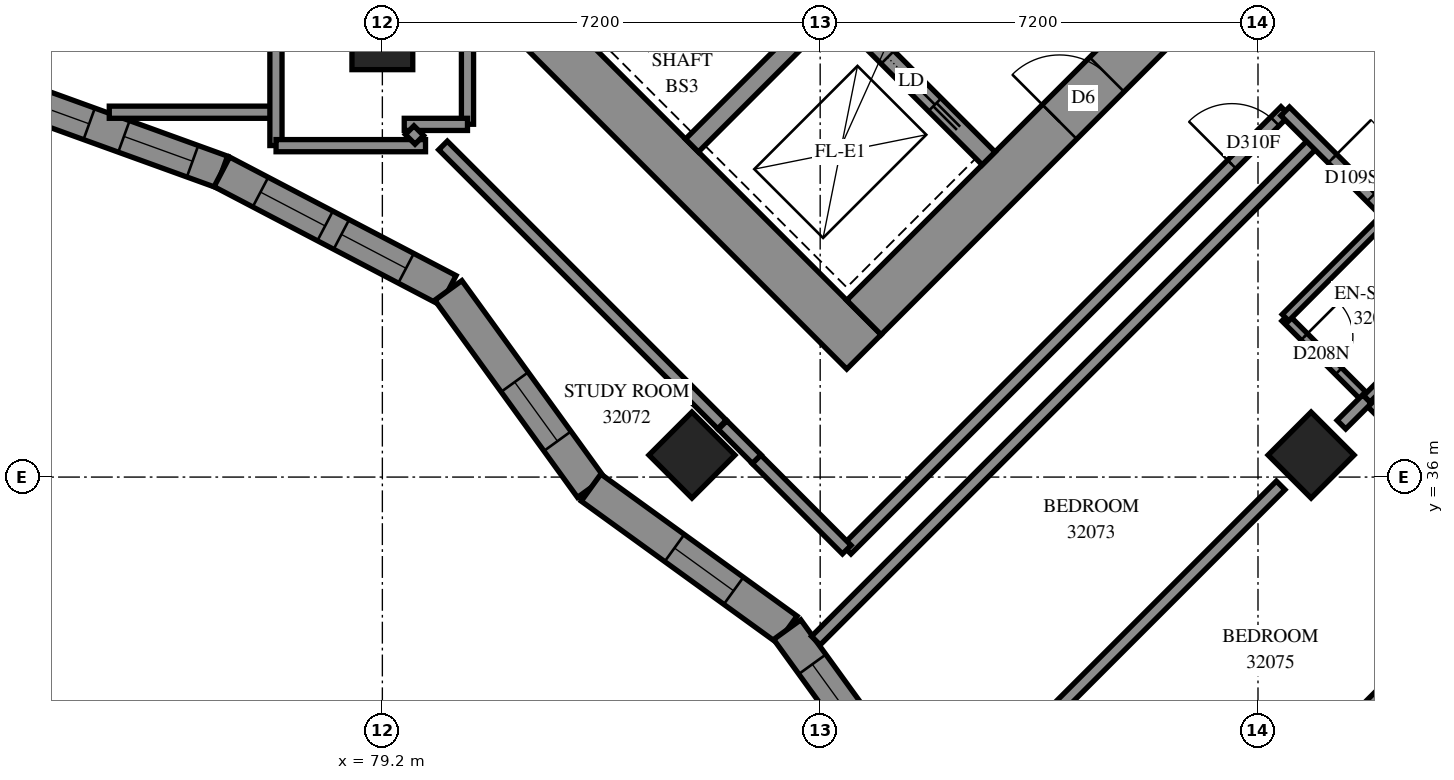
"""IFC4 building model, lengths in metres.
Left out: names, types, materials, properties, quantities, classifications, styles, units other than length and angle.
Written with IfcOpenShell. Run it as: python <this file> out.ifc"""

import sys

from ifc_helpers import new_model, si_unit, direction, frame, frame_2d, origin, origin_2d, place, context, subcontext, project, spatial, polyline, rectangle, outline, extrude, element, fill, save


model = new_model("IFC4")
c1 = context("Model", 3, precision=1e-05, world=origin(), true_north=direction((0.0, 1.0)))
c2 = subcontext(c1, "Body", "Model", "MODEL_VIEW")
j1 = project(units=[si_unit("LENGTHUNIT", "METRE"), si_unit("PLANEANGLEUNIT", "RADIAN")], contexts=[c1])
p1 = place(None, origin())
s1 = spatial("IfcSite", under=j1, at=p1, CompositionType="ELEMENT")
p2 = place(p1, origin())
s2 = spatial("IfcBuilding", under=s1, at=p2, CompositionType="ELEMENT")
p3 = place(p2, frame((0.0, 0.0, 118.6)))
s3 = spatial("IfcBuildingStorey", under=s2, at=p3, CompositionType="ELEMENT", Elevation=118.6)
for number, where, z_axis, x_axis in (
    (1, (79.2, 43.2, 0.0), (0.0, 0.0, 1.0), (1.0, 0.0, 0.0)),
    (2, (84.291, 36.362, 0.0), (0.0, 0.0, 1.0), (0.707, -0.707, 0.0)),
    (3, (94.474, 36.362, 0.0), (0.0, 0.0, 1.0), (0.707, -0.707, 0.0)),
):
    element("IfcColumn", number, at=place(p3, frame(where, z_axis=z_axis, x_axis=x_axis)), inside=s3, PredefinedType="COLUMN", context=c2, shape_type="SweptSolid", body=[
        extrude(rectangle(XDim=1.0, YDim=1.0, at=origin_2d()), origin(), (0.0, 0.0, 1.0), 3.1),
    ])
p4 = place(p3, frame((75.806, 49.373, -0.3), z_axis=(0.0, 0.0, 1.0), x_axis=(0.7071067812, -0.7071067812, 0.0)))
e4 = element("IfcWall", 4, at=p4, inside=s3, PredefinedType="SHEAR", context=c2, shape_type="SweptSolid", body=[
    extrude(rectangle(XDim=16.0, YDim=0.8, at=frame_2d((8.0, 0.0))), origin(), (0.0, 0.0, 1.0), 2.7),
])
p5 = place(p3, frame((87.12, 38.625, -0.3), z_axis=(0.0, 0.0, 1.0), x_axis=(0.7071067812, 0.7071067812, 0.0)))
e5 = element("IfcWall", 5, at=p5, inside=s3, PredefinedType="SHEAR", context=c2, shape_type="SweptSolid", body=[
    extrude(rectangle(XDim=14.4, YDim=0.8, at=frame_2d((7.2, 0.0))), origin(), (0.0, 0.0, 1.0), 2.7),
])
p6 = place(p5, frame((4.55, 0.0, 0.3)))
e6 = element("IfcOpeningElement", 6, at=p6, cuts=e5, PredefinedType="OPENING", context=c2, shape_type="SweptSolid", body=[
    extrude(rectangle(XDim=1.1, YDim=2.1, at=frame_2d((0.55, 1.05))), frame((0.0, 0.41, 0.0), z_axis=(0.0, -1.0, 0.0), x_axis=(1.0, 0.0, 0.0)), (0.0, 0.0, 1.0), 0.82),
])
p7 = place(p5, frame((11.35, 0.0, 0.3)))
e7 = element("IfcOpeningElement", 7, at=p7, cuts=e5, PredefinedType="OPENING", context=c2, shape_type="SweptSolid", body=[
    extrude(rectangle(XDim=1.1, YDim=2.1, at=frame_2d((0.55, 1.05))), frame((0.0, 0.41, 0.0), z_axis=(0.0, -1.0, 0.0), x_axis=(1.0, 0.0, 0.0)), (0.0, 0.0, 1.0), 0.82),
])
p8 = place(p3, frame((84.291, 41.453, 0.0), z_axis=(0.0, 0.0, 1.0), x_axis=(0.7071067812, 0.7071067812, 0.0)))
e8 = element("IfcWall", 8, at=p8, inside=s3, PredefinedType="SOLIDWALL", context=c2, shape_type="SweptSolid", body=[
    extrude(rectangle(XDim=3.3, YDim=0.3, at=frame_2d((1.65, 0.0))), origin(), (0.0, 0.0, 1.0), 3.1),
])
p9 = place(p3, frame((78.988, 51.423, 0.0), z_axis=(0.0, 0.0, 1.0), x_axis=(0.7071067812, -0.7071067812, 0.0)))
e9 = element("IfcWall", 9, at=p9, inside=s3, PredefinedType="SOLIDWALL", context=c2, shape_type="SweptSolid", body=[
    extrude(rectangle(XDim=14.4, YDim=0.3, at=frame_2d((7.2, 0.0))), origin(), (0.0, 0.0, 1.0), 3.1),
])
p10 = place(p9, frame((1.25, 0.0, 0.0)))
e10 = element("IfcOpeningElement", 10, at=p10, cuts=e9, PredefinedType="OPENING", context=c2, shape_type="SweptSolid", body=[
    extrude(rectangle(XDim=1.1, YDim=2.1, at=frame_2d((0.55, 1.05))), frame((0.0, 0.16, 0.0), z_axis=(0.0, -1.0, 0.0), x_axis=(1.0, 0.0, 0.0)), (0.0, 0.0, 1.0), 0.32),
])
p11 = place(p9, frame((4.85, 0.0, 0.0)))
e11 = element("IfcOpeningElement", 11, at=p11, cuts=e9, PredefinedType="OPENING", context=c2, shape_type="SweptSolid", body=[
    extrude(rectangle(XDim=1.1, YDim=2.1, at=frame_2d((0.55, 1.05))), frame((0.0, 0.16, 0.0), z_axis=(0.0, -1.0, 0.0), x_axis=(1.0, 0.0, 0.0)), (0.0, 0.0, 1.0), 0.32),
])
p12 = place(p9, frame((8.45, 0.0, 0.0)))
e12 = element("IfcOpeningElement", 12, at=p12, cuts=e9, PredefinedType="OPENING", context=c2, shape_type="SweptSolid", body=[
    extrude(rectangle(XDim=1.1, YDim=2.1, at=frame_2d((0.55, 1.05))), frame((0.0, 0.16, 0.0), z_axis=(0.0, -1.0, 0.0), x_axis=(1.0, 0.0, 0.0)), (0.0, 0.0, 1.0), 0.32),
])
p13 = place(p9, frame((12.05, 0.0, 0.0)))
e13 = element("IfcOpeningElement", 13, at=p13, cuts=e9, PredefinedType="OPENING", context=c2, shape_type="SweptSolid", body=[
    extrude(rectangle(XDim=1.1, YDim=2.1, at=frame_2d((0.55, 1.05))), frame((0.0, 0.16, 0.0), z_axis=(0.0, -1.0, 0.0), x_axis=(1.0, 0.0, 0.0)), (0.0, 0.0, 1.0), 0.32),
])
p14 = place(p3, frame((73.067, 42.284, 0.0), z_axis=(0.0, 0.0, 1.0), x_axis=(0.9402976308, -0.3403532953, 0.0)))
e14 = element("IfcWall", 14, at=p14, inside=s3, PredefinedType="SOLIDWALL", context=c2, shape_type="SweptSolid", body=[
    extrude(outline(polyline([(0.075, -0.275), (3.697, -0.275), (3.734, 0.275), (-0.075, 0.275), (0.075, -0.275)])), origin(), (0.0, 0.0, 1.0), 3.1),
])
p15 = place(p14, frame((0.396, 0.0, 0.45)))
e15 = element("IfcOpeningElement", 15, at=p15, cuts=e14, PredefinedType="OPENING", context=c2, shape_type="SweptSolid", body=[
    extrude(rectangle(XDim=1.0, YDim=2.5, at=frame_2d((0.5, 1.25))), frame((0.0, 0.285, 0.0), z_axis=(0.0, -1.0, 0.0), x_axis=(1.0, 0.0, 0.0)), (0.0, 0.0, 1.0), 0.57),
])
p16 = place(p14, frame((2.003, 0.0, 0.5)))
e16 = element("IfcOpeningElement", 16, at=p16, cuts=e14, PredefinedType="OPENING", context=c2, shape_type="SweptSolid", body=[
    extrude(rectangle(XDim=1.2, YDim=2.45, at=frame_2d((0.6, 1.225))), frame((0.0, 0.285, 0.0), z_axis=(0.0, -1.0, 0.0), x_axis=(1.0, 0.0, 0.0)), (0.0, 0.0, 1.0), 0.57),
])
p17 = place(p3, frame((76.561, 41.019, 0.0), z_axis=(0.0, 0.0, 1.0), x_axis=(0.8859460506, -0.4637883089, 0.0)))
e17 = element("IfcWall", 17, at=p17, inside=s3, PredefinedType="SOLIDWALL", context=c2, shape_type="SweptSolid", body=[
    extrude(outline(polyline([(0.019, -0.275), (4.139, -0.275), (4.268, 0.275), (-0.019, 0.275), (0.019, -0.275)])), origin(), (0.0, 0.0, 1.0), 3.1),
])
p18 = place(p17, frame((0.717, 0.0, 0.5)))
e18 = element("IfcOpeningElement", 18, at=p18, cuts=e17, PredefinedType="OPENING", context=c2, shape_type="SweptSolid", body=[
    extrude(rectangle(XDim=1.2, YDim=2.45, at=frame_2d((0.6, 1.225))), frame((0.0, 0.285, 0.0), z_axis=(0.0, -1.0, 0.0), x_axis=(1.0, 0.0, 0.0)), (0.0, 0.0, 1.0), 0.57),
])
p19 = place(p17, frame((2.219, 0.0, 0.5)))
e19 = element("IfcOpeningElement", 19, at=p19, cuts=e17, PredefinedType="OPENING", context=c2, shape_type="SweptSolid", body=[
    extrude(rectangle(XDim=1.2, YDim=2.45, at=frame_2d((0.6, 1.225))), frame((0.0, 0.285, 0.0), z_axis=(0.0, -1.0, 0.0), x_axis=(1.0, 0.0, 0.0)), (0.0, 0.0, 1.0), 0.57),
])
p20 = place(p3, frame((80.285, 39.07, 0.0), z_axis=(0.0, 0.0, 1.0), x_axis=(0.5863448025, -0.8100615857, 0.0)))
e20 = element("IfcWall", 20, at=p20, inside=s3, PredefinedType="SOLIDWALL", context=c2, shape_type="SweptSolid", body=[
    extrude(outline(polyline([(0.065, -0.275), (4.047, -0.275), (3.959, 0.275), (-0.065, 0.275), (0.065, -0.275)])), origin(), (0.0, 0.0, 1.0), 3.1),
])
p21 = place(p20, frame((1.861, 0.0, 0.5)))
e21 = element("IfcOpeningElement", 21, at=p21, cuts=e20, PredefinedType="OPENING", context=c2, shape_type="SweptSolid", body=[
    extrude(rectangle(XDim=1.2, YDim=2.45, at=frame_2d((0.6, 1.225))), frame((0.0, 0.285, 0.0), z_axis=(0.0, -1.0, 0.0), x_axis=(1.0, 0.0, 0.0)), (0.0, 0.0, 1.0), 0.57),
])
p22 = place(p3, frame((82.632, 35.827, 0.0), z_axis=(0.0, 0.0, 1.0), x_axis=(0.8100630266, -0.5863428119, 0.0)))
e22 = element("IfcWall", 22, at=p22, inside=s3, PredefinedType="SOLIDWALL", context=c2, shape_type="SweptSolid", body=[
    extrude(outline(polyline([(-0.044, -0.275), (3.939, -0.275), (4.027, 0.275), (0.044, 0.275), (-0.044, -0.275)])), origin(), (0.0, 0.0, 1.0), 3.1),
])
p23 = place(p22, frame((1.694, 0.0, 0.5)))
e23 = element("IfcOpeningElement", 23, at=p23, cuts=e22, PredefinedType="OPENING", context=c2, shape_type="SweptSolid", body=[
    extrude(rectangle(XDim=1.2, YDim=2.45, at=frame_2d((0.6, 1.225))), frame((0.0, 0.285, 0.0), z_axis=(0.0, -1.0, 0.0), x_axis=(1.0, 0.0, 0.0)), (0.0, 0.0, 1.0), 0.57),
])
p24 = place(p3, frame((85.858, 33.492, 0.0), z_axis=(0.0, 0.0, 1.0), x_axis=(0.5863547381, -0.8100543939, 0.0)))
e24 = element("IfcWall", 24, at=p24, inside=s3, PredefinedType="SOLIDWALL", context=c2, shape_type="SweptSolid", body=[
    extrude(outline(polyline([(0.044, -0.275), (4.027, -0.275), (3.939, 0.275), (-0.044, 0.275), (0.044, -0.275)])), origin(), (0.0, 0.0, 1.0), 3.1),
])
p25 = place(p24, frame((0.704, 0.0, 0.5)))
e25 = element("IfcOpeningElement", 25, at=p25, cuts=e24, PredefinedType="OPENING", context=c2, shape_type="SweptSolid", body=[
    extrude(rectangle(XDim=1.3, YDim=2.45, at=frame_2d((0.65, 1.225))), frame((0.0, 0.285, 0.0), z_axis=(0.0, -1.0, 0.0), x_axis=(1.0, 0.0, 0.0)), (0.0, 0.0, 1.0), 0.57),
])
p26 = place(p24, frame((2.204, 0.0, 0.5)))
e26 = element("IfcOpeningElement", 26, at=p26, cuts=e24, PredefinedType="OPENING", context=c2, shape_type="SweptSolid", body=[
    extrude(rectangle(XDim=1.3, YDim=2.45, at=frame_2d((0.65, 1.225))), frame((0.0, 0.285, 0.0), z_axis=(0.0, -1.0, 0.0), x_axis=(1.0, 0.0, 0.0)), (0.0, 0.0, 1.0), 0.57),
])
p27 = place(p3, frame((86.329, 33.31, 0.0), z_axis=(0.0, 0.0, 1.0), x_axis=(0.7071067812, 0.7071067812, 0.0)))
e27 = element("IfcWall", 27, at=p27, inside=s3, PredefinedType="PARTITIONING", context=c2, shape_type="SweptSolid", body=[
    extrude(rectangle(XDim=11.617, YDim=0.2, at=frame_2d((5.808, 0.0))), origin(), (0.0, 0.0, 1.0), 3.1),
])
p28 = place(p3, frame((91.45, 28.248, 0.0), z_axis=(0.0, 0.0, 1.0), x_axis=(0.7071931644, 0.7070203875, 0.0)))
e28 = element("IfcWall", 28, at=p28, inside=s3, PredefinedType="PARTITIONING", context=c2, shape_type="SweptSolid", body=[
    extrude(rectangle(XDim=11.576, YDim=0.2, at=frame_2d((5.788, 0.0))), origin(), (0.0, 0.0, 1.0), 3.1),
])
p29 = place(p3, frame((86.835, 34.806, 0.0), z_axis=(0.0, 0.0, 1.0), x_axis=(0.7071067812, 0.7071067812, 0.0)))
e29 = element("IfcWall", 29, at=p29, inside=s3, PredefinedType="PARTITIONING", context=c2, shape_type="SweptSolid", body=[
    extrude(rectangle(XDim=10.201, YDim=0.2, at=frame_2d((5.1, 0.0))), origin(), (0.0, 0.0, 1.0), 3.1),
])
p30 = place(p29, frame((8.959, 0.0, 0.0)))
e30 = element("IfcOpeningElement", 30, at=p30, cuts=e29, PredefinedType="OPENING", context=c2, shape_type="SweptSolid", body=[
    extrude(rectangle(XDim=1.0, YDim=2.1, at=frame_2d((0.5, 1.05))), frame((0.0, 0.11, 0.0), z_axis=(0.0, -1.0, 0.0), x_axis=(1.0, 0.0, 0.0)), (0.0, 0.0, 1.0), 0.22),
])
p31 = place(p3, frame((94.047, 42.015, 0.0), z_axis=(0.0, 0.0, 1.0), x_axis=(0.7071067812, -0.7071067812, 0.0)))
e31 = element("IfcWall", 31, at=p31, inside=s3, PredefinedType="PARTITIONING", context=c2, shape_type="SweptSolid", body=[
    extrude(rectangle(XDim=9.6, YDim=0.2, at=frame_2d((4.8, 0.0))), origin(), (0.0, 0.0, 1.0), 3.1),
])
p32 = place(p31, frame((1.099, 0.0, 0.0)))
e32 = element("IfcOpeningElement", 32, at=p32, cuts=e31, PredefinedType="OPENING", context=c2, shape_type="SweptSolid", body=[
    extrude(rectangle(XDim=0.9, YDim=2.1, at=frame_2d((0.45, 1.05))), frame((0.0, 0.11, 0.0), z_axis=(0.0, -1.0, 0.0), x_axis=(1.0, 0.0, 0.0)), (0.0, 0.0, 1.0), 0.22),
])
p33 = place(p31, frame((6.649, 0.0, 0.0)))
e33 = element("IfcOpeningElement", 33, at=p33, cuts=e31, PredefinedType="OPENING", context=c2, shape_type="SweptSolid", body=[
    extrude(rectangle(XDim=0.9, YDim=2.1, at=frame_2d((0.45, 1.05))), frame((0.0, 0.11, 0.0), z_axis=(0.0, -1.0, 0.0), x_axis=(1.0, 0.0, 0.0)), (0.0, 0.0, 1.0), 0.22),
])
p34 = place(p31, frame((8.3, 0.0, 0.0)))
e34 = element("IfcOpeningElement", 34, at=p34, cuts=e31, PredefinedType="OPENING", context=c2, shape_type="SweptSolid", body=[
    extrude(rectangle(XDim=0.9, YDim=2.1, at=frame_2d((0.45, 1.05))), frame((0.0, 0.11, 0.0), z_axis=(0.0, -1.0, 0.0), x_axis=(1.0, 0.0, 0.0)), (0.0, 0.0, 1.0), 0.22),
])
p35 = place(p3, frame((80.197, 41.453, 0.0), z_axis=(0.0, 0.0, 1.0), x_axis=(0.7071067812, -0.7071067812, 0.0)))
e35 = element("IfcWall", 35, at=p35, inside=s3, PredefinedType="PARTITIONING", context=c2, shape_type="SweptSolid", body=[
    extrude(rectangle(XDim=6.488, YDim=0.2, at=frame_2d((3.244, 0.0))), origin(), (0.0, 0.0, 1.0), 3.1),
])
p36 = place(p3, frame((89.881, 31.771, 0.0), z_axis=(0.0, 0.0, 1.0), x_axis=(0.7071067812, 0.7071067812, 0.0)))
e36 = element("IfcWall", 36, at=p36, inside=s3, PredefinedType="PARTITIONING", context=c2, shape_type="SweptSolid", body=[
    extrude(rectangle(XDim=5.787, YDim=0.2, at=frame_2d((2.893, 0.0))), origin(), (0.0, 0.0, 1.0), 3.1),
])
p37 = place(p3, frame((94.047, 38.621, 0.0), z_axis=(0.0, 0.0, 1.0), x_axis=(0.7071067812, -0.7071067812, 0.0)))
e37 = element("IfcWall", 37, at=p37, inside=s3, PredefinedType="PARTITIONING", context=c2, shape_type="SweptSolid", body=[
    extrude(rectangle(XDim=3.799, YDim=0.15, at=frame_2d((1.899, 0.0))), origin(), (0.0, 0.0, 1.0), 3.1),
])
p38 = place(p37, frame((0.444, 0.0, 0.0)))
e38 = element("IfcOpeningElement", 38, at=p38, cuts=e37, PredefinedType="OPENING", context=c2, shape_type="SweptSolid", body=[
    extrude(rectangle(XDim=0.8, YDim=2.1, at=frame_2d((0.4, 1.05))), frame((0.0, 0.085, 0.0), z_axis=(0.0, -1.0, 0.0), x_axis=(1.0, 0.0, 0.0)), (0.0, 0.0, 1.0), 0.17),
])
p39 = place(p37, frame((2.551, 0.0, 0.0)))
e39 = element("IfcOpeningElement", 39, at=p39, cuts=e37, PredefinedType="OPENING", context=c2, shape_type="SweptSolid", body=[
    extrude(rectangle(XDim=0.8, YDim=2.1, at=frame_2d((0.4, 1.05))), frame((0.0, 0.085, 0.0), z_axis=(0.0, -1.0, 0.0), x_axis=(1.0, 0.0, 0.0)), (0.0, 0.0, 1.0), 0.17),
])
p40 = place(p3, frame((74.709, 42.0, 0.0), z_axis=(0.0, 0.0, 1.0), x_axis=(1.0, 0.0, 0.0)))
e40 = element("IfcWall", 40, at=p40, inside=s3, PredefinedType="PARTITIONING", context=c2, shape_type="SweptSolid", body=[
    extrude(rectangle(XDim=2.741, YDim=0.2, at=frame_2d((1.37, 0.0))), origin(), (0.0, 0.0, 1.0), 3.1),
])
for number, where, z_axis, x_axis in (
    (41, (77.45, 41.452, 0.0), (0.0, 0.0, 1.0), (0.0, 1.0, 0.0)),
    (42, (77.452, 41.45, 0.0), (0.0, 0.0, 1.0), (1.0, 0.0, 0.0)),
):
    element("IfcWall", number, at=place(p3, frame(where, z_axis=z_axis, x_axis=x_axis)), inside=s3, PredefinedType="PARTITIONING", context=c2, shape_type="SweptSolid", body=[
        extrude(rectangle(XDim=2.458, YDim=0.2, at=frame_2d((1.229, 0.0))), origin(), (0.0, 0.0, 1.0), 3.1),
    ])
for number, where, z_axis, x_axis in (
    (43, (95.389, 37.285, 0.0), (0.0, 0.0, 1.0), (0.708, 0.707, 0.0)),
    (44, (94.052, 38.622, 0.0), (0.0, 0.0, 1.0), (0.707, 0.708, 0.0)),
):
    element("IfcWall", number, at=place(p3, frame(where, z_axis=z_axis, x_axis=x_axis)), inside=s3, PredefinedType="PARTITIONING", context=c2, shape_type="SweptSolid", body=[
        extrude(rectangle(XDim=2.4, YDim=0.15, at=frame_2d((1.2, 0.0))), origin(), (0.0, 0.0, 1.0), 3.1),
    ])
p41 = place(p3, frame((85.353, 36.293, 0.0), z_axis=(0.0, 0.0, 1.0), x_axis=(0.7066304548, -0.7075827869, 0.0)))
e45 = element("IfcWall", 45, at=p41, inside=s3, PredefinedType="PARTITIONING", context=c2, shape_type="SweptSolid", body=[
    extrude(rectangle(XDim=2.1, YDim=0.2, at=frame_2d((1.05, 0.0))), origin(), (0.0, 0.0, 1.0), 3.1),
])
p42 = place(p3, frame((80.6, 41.802, 0.0), z_axis=(0.0, 0.0, 1.0), x_axis=(0.0, 1.0, 0.0)))
e46 = element("IfcWall", 46, at=p42, inside=s3, PredefinedType="PARTITIONING", context=c2, shape_type="SweptSolid", body=[
    extrude(rectangle(XDim=2.098, YDim=0.2, at=frame_2d((1.049, 0.0))), origin(), (0.0, 0.0, 1.0), 3.1),
])
p43 = place(p3, frame((79.56, 41.8, 0.0), z_axis=(0.0, 0.0, 1.0), x_axis=(1.0, 0.0, 0.0)))
e47 = element("IfcWall", 47, at=p43, inside=s3, PredefinedType="PARTITIONING", context=c2, shape_type="SweptSolid", body=[
    extrude(rectangle(XDim=1.04, YDim=0.2, at=frame_2d((0.52, 0.0))), origin(), (0.0, 0.0, 1.0), 3.1),
])
p44 = place(p3, frame((84.795, 36.855, 0.0), z_axis=(0.0, 0.0, 1.0), x_axis=(0.7071067812, -0.7071067812, 0.0)))
e48 = element("IfcWall", 48, at=p44, inside=s3, PredefinedType="PARTITIONING", context=c2, shape_type="SweptSolid", body=[
    extrude(rectangle(XDim=0.792, YDim=0.2, at=frame_2d((0.396, 0.0))), origin(), (0.0, 0.0, 1.0), 3.1),
])
p45 = place(p3, frame((94.972, 36.862, 0.0), z_axis=(0.0, 0.0, 1.0), x_axis=(0.7071067812, 0.7071067812, 0.0)))
e49 = element("IfcWall", 49, at=p45, inside=s3, PredefinedType="PARTITIONING", context=c2, shape_type="SweptSolid", body=[
    extrude(rectangle(XDim=0.594, YDim=0.2, at=frame_2d((0.297, 0.0))), origin(), (0.0, 0.0, 1.0), 3.1),
])
p46 = place(p3, frame((79.649, 41.705, 0.0), z_axis=(0.0, 0.0, 1.0), x_axis=(0.7068844555, -0.707329037, 0.0)))
e50 = element("IfcWall", 50, at=p46, inside=s3, PredefinedType="PARTITIONING", context=c2, shape_type="SweptSolid", body=[
    extrude(rectangle(XDim=0.225, YDim=0.2, at=frame_2d((0.112, 0.0))), origin(), (0.0, 0.0, 1.0), 3.1),
])
p47 = place(p18, origin())
e51 = element("IfcWindow", 51, at=p47, inside=s3, PartitioningType="SINGLE_PANEL", PredefinedType="WINDOW", context=c2, shape_type="SweptSolid", body=[
    extrude(rectangle(XDim=1.2, YDim=2.45, at=frame_2d((0.6, 1.225))), frame((0.0, 0.155, 0.0), z_axis=(0.0, -1.0, 0.0), x_axis=(1.0, 0.0, 0.0)), (0.0, 0.0, 1.0), 0.06),
])
fill(e18, e51)
p48 = place(p19, origin())
e52 = element("IfcWindow", 52, at=p48, inside=s3, PartitioningType="SINGLE_PANEL", PredefinedType="WINDOW", context=c2, shape_type="SweptSolid", body=[
    extrude(rectangle(XDim=1.2, YDim=2.45, at=frame_2d((0.6, 1.225))), frame((0.0, 0.155, 0.0), z_axis=(0.0, -1.0, 0.0), x_axis=(1.0, 0.0, 0.0)), (0.0, 0.0, 1.0), 0.06),
])
fill(e19, e52)
p49 = place(p21, origin())
e53 = element("IfcWindow", 53, at=p49, inside=s3, PartitioningType="SINGLE_PANEL", PredefinedType="WINDOW", context=c2, shape_type="SweptSolid", body=[
    extrude(rectangle(XDim=1.2, YDim=2.45, at=frame_2d((0.6, 1.225))), frame((0.0, 0.155, 0.0), z_axis=(0.0, -1.0, 0.0), x_axis=(1.0, 0.0, 0.0)), (0.0, 0.0, 1.0), 0.06),
])
fill(e21, e53)
p50 = place(p23, origin())
e54 = element("IfcWindow", 54, at=p50, inside=s3, PartitioningType="SINGLE_PANEL", PredefinedType="WINDOW", context=c2, shape_type="SweptSolid", body=[
    extrude(rectangle(XDim=1.2, YDim=2.45, at=frame_2d((0.6, 1.225))), frame((0.0, 0.155, 0.0), z_axis=(0.0, -1.0, 0.0), x_axis=(1.0, 0.0, 0.0)), (0.0, 0.0, 1.0), 0.06),
])
fill(e23, e54)
p51 = place(p25, origin())
e55 = element("IfcWindow", 55, at=p51, inside=s3, PartitioningType="SINGLE_PANEL", PredefinedType="WINDOW", context=c2, shape_type="SweptSolid", body=[
    extrude(rectangle(XDim=1.3, YDim=2.45, at=frame_2d((0.65, 1.225))), frame((0.0, 0.155, 0.0), z_axis=(0.0, -1.0, 0.0), x_axis=(1.0, 0.0, 0.0)), (0.0, 0.0, 1.0), 0.06),
])
fill(e25, e55)
p52 = place(p6, origin())
e56 = element("IfcDoor", 56, at=p52, inside=s3, OperationType="DOUBLE_DOOR_SINGLE_SWING", PredefinedType="DOOR", context=c2, shape_type="SweptSolid", body=[
    extrude(rectangle(XDim=1.1, YDim=2.1, at=frame_2d((0.55, 1.05))), frame((0.0, 0.025, 0.0), z_axis=(0.0, -1.0, 0.0), x_axis=(1.0, 0.0, 0.0)), (0.0, 0.0, 1.0), 0.05),
])
fill(e6, e56)
p53 = place(p13, origin())
e57 = element("IfcDoor", 57, at=p53, inside=s3, OperationType="SLIDING_TO_RIGHT", PredefinedType="DOOR", context=c2, shape_type="SweptSolid", body=[
    extrude(rectangle(XDim=1.1, YDim=2.1, at=frame_2d((0.55, 1.05))), frame((0.0, 0.025, 0.0), z_axis=(0.0, -1.0, 0.0), x_axis=(1.0, 0.0, 0.0)), (0.0, 0.0, 1.0), 0.05),
])
fill(e13, e57)
p54 = place(p30, origin())
e58 = element("IfcDoor", 58, at=p54, inside=s3, OperationType="SINGLE_SWING_LEFT", PredefinedType="DOOR", context=c2, shape_type="SweptSolid", body=[
    extrude(rectangle(XDim=1.0, YDim=2.1, at=frame_2d((0.5, 1.05))), frame((0.0, 0.025, 0.0), z_axis=(0.0, -1.0, 0.0), x_axis=(1.0, 0.0, 0.0)), (0.0, 0.0, 1.0), 0.05),
])
fill(e30, e58)
p55 = place(p32, origin())
e59 = element("IfcDoor", 59, at=p55, inside=s3, OperationType="SINGLE_SWING_LEFT", PredefinedType="DOOR", context=c2, shape_type="SweptSolid", body=[
    extrude(rectangle(XDim=0.9, YDim=2.1, at=frame_2d((0.45, 1.05))), frame((0.0, 0.025, 0.0), z_axis=(0.0, -1.0, 0.0), x_axis=(1.0, 0.0, 0.0)), (0.0, 0.0, 1.0), 0.05),
])
fill(e32, e59)
p56 = place(p38, origin())
e60 = element("IfcDoor", 60, at=p56, inside=s3, OperationType="SINGLE_SWING_RIGHT", PredefinedType="DOOR", context=c2, shape_type="SweptSolid", body=[
    extrude(rectangle(XDim=0.8, YDim=2.1, at=frame_2d((0.4, 1.05))), frame((0.0, 0.025, 0.0), z_axis=(0.0, -1.0, 0.0), x_axis=(1.0, 0.0, 0.0)), (0.0, 0.0, 1.0), 0.05),
])
fill(e38, e60)
p57 = place(p15, origin())
e61 = element("IfcWindow", 61, at=p57, inside=s3, PartitioningType="SINGLE_PANEL", PredefinedType="WINDOW", context=c2, shape_type="SweptSolid", body=[
    extrude(rectangle(XDim=1.0, YDim=2.5, at=frame_2d((0.5, 1.25))), frame((0.0, 0.155, 0.0), z_axis=(0.0, -1.0, 0.0), x_axis=(1.0, 0.0, 0.0)), (0.0, 0.0, 1.0), 0.06),
])
fill(e15, e61)
p58 = place(p16, origin())
e62 = element("IfcWindow", 62, at=p58, inside=s3, PartitioningType="SINGLE_PANEL", PredefinedType="WINDOW", context=c2, shape_type="SweptSolid", body=[
    extrude(rectangle(XDim=1.2, YDim=2.45, at=frame_2d((0.6, 1.225))), frame((0.0, 0.155, 0.0), z_axis=(0.0, -1.0, 0.0), x_axis=(1.0, 0.0, 0.0)), (0.0, 0.0, 1.0), 0.06),
])
fill(e16, e62)
save(model, sys.argv[1])
